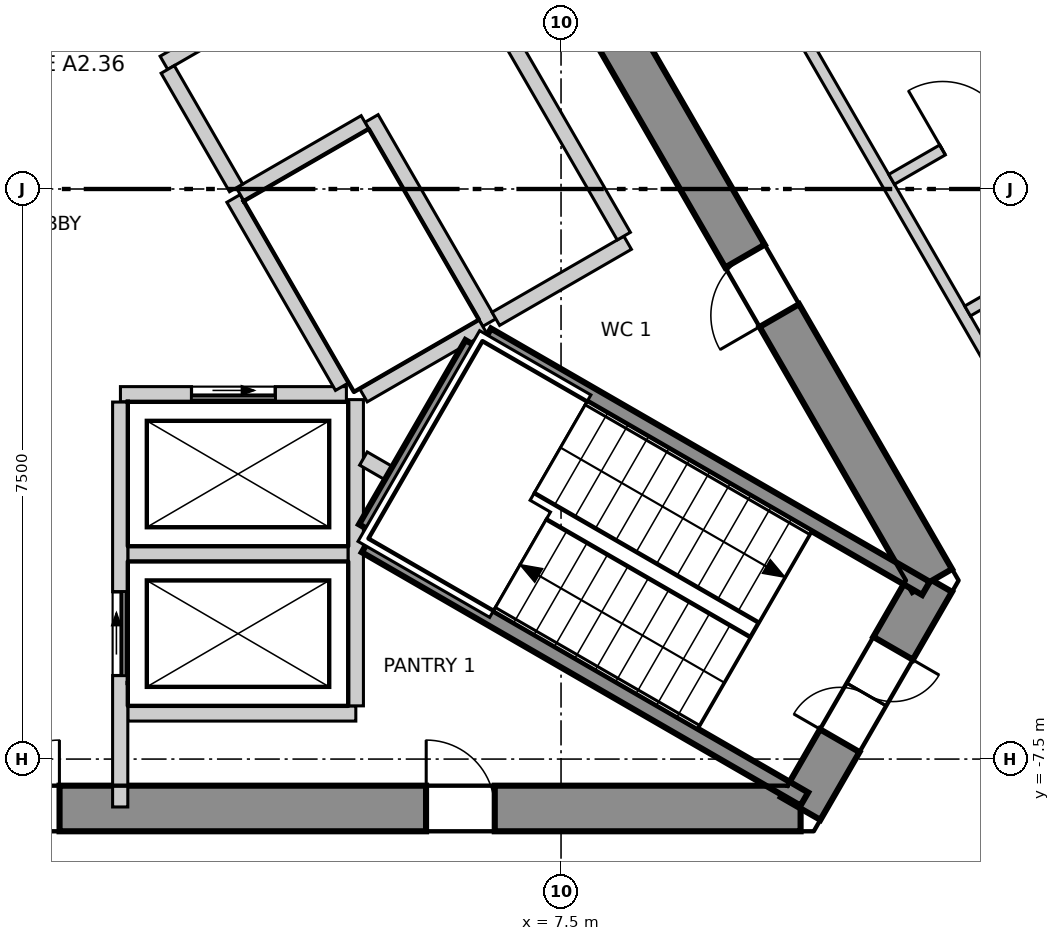
"""IFC4 building model, lengths in metres.
Left out: names, types, materials, properties, quantities, classifications, styles, units other than length and angle.
Written with IfcOpenShell. Run it as: python <this file> out.ifc"""

import sys

from ifc_helpers import new_model, si_unit, direction, frame, frame_2d, origin, place, context, subcontext, project, spatial, polyline, rectangle, outline, extrude, element, fill, save


model = new_model("IFC4")
c1 = context("Model", 3, precision=1e-05, world=origin(), true_north=direction((0.0, 1.0)))
c2 = subcontext(c1, "Body", "Model", "MODEL_VIEW")
j1 = project(units=[si_unit("LENGTHUNIT", "METRE"), si_unit("PLANEANGLEUNIT", "RADIAN")], contexts=[c1])
p1 = place(None, origin())
s1 = spatial("IfcSite", under=j1, at=p1, CompositionType="ELEMENT")
p2 = place(p1, origin())
s2 = spatial("IfcBuilding", under=s1, at=p2, CompositionType="ELEMENT")
p3 = place(p2, frame((0.0, 0.0, 311.5)))
s3 = spatial("IfcBuildingStorey", under=s2, at=p3, CompositionType="ELEMENT", Elevation=311.5)
p4 = place(p3, frame((-10.652, -8.15, -0.3), z_axis=(0.0, 0.0, 1.0), x_axis=(1.0, 0.0, 0.0)))
e1 = element("IfcWall", 1, at=p4, inside=s3, PredefinedType="SHEAR", context=c2, shape_type="SweptSolid", body=[
    extrude(outline(polyline([(-0.173, -0.3), (1.795, -0.3), (3.763, -0.3), (5.731, -0.3), (7.7, -0.3), (9.668, -0.3), (11.636, -0.3), (13.604, -0.3), (15.573, -0.3), (17.541, -0.3), (19.509, -0.3), (21.477, -0.3), (21.131, 0.3), (19.226, 0.3), (17.321, 0.3), (15.415, 0.3), (13.51, 0.3), (11.605, 0.3), (9.699, 0.3), (7.794, 0.3), (5.889, 0.3), (3.984, 0.3), (2.078, 0.3), (0.173, 0.3), (-0.173, -0.3)])), origin(), (0.0, 0.0, 1.0), 3.6),
])
p5 = place(p4, frame((9.752, 0.0, 0.3)))
e2 = element("IfcOpeningElement", 2, at=p5, cuts=e1, PredefinedType="OPENING", context=c2, shape_type="SweptSolid", body=[
    extrude(rectangle(XDim=1.8, YDim=2.1, at=frame_2d((0.9, 1.05))), frame((0.0, 0.31, 0.0), z_axis=(0.0, -1.0, 0.0), x_axis=(1.0, 0.0, 0.0)), (0.0, 0.0, 1.0), 0.62),
])
p6 = place(p4, frame((4.777, 0.0, 0.3)))
e3 = element("IfcOpeningElement", 3, at=p6, cuts=e1, PredefinedType="OPENING", context=c2, shape_type="SweptSolid", body=[
    extrude(rectangle(XDim=0.9, YDim=2.1, at=frame_2d((0.45, 1.05))), frame((0.0, 0.31, 0.0), z_axis=(0.0, -1.0, 0.0), x_axis=(1.0, 0.0, 0.0)), (0.0, 0.0, 1.0), 0.62),
])
p7 = place(p4, frame((16.378, 0.0, 0.3)))
e4 = element("IfcOpeningElement", 4, at=p7, cuts=e1, PredefinedType="OPENING", context=c2, shape_type="SweptSolid", body=[
    extrude(rectangle(XDim=0.9, YDim=2.1, at=frame_2d((0.45, 1.05))), frame((0.0, 0.31, 0.0), z_axis=(0.0, -1.0, 0.0), x_axis=(1.0, 0.0, 0.0)), (0.0, 0.0, 1.0), 0.62),
])
p8 = place(p3, frame((10.652, -8.15, -0.3), z_axis=(0.0, 0.0, 1.0), x_axis=(0.49997462182, 0.866040055388, 0.0)))
e5 = element("IfcWall", 5, at=p8, inside=s3, PredefinedType="SHEAR", context=c2, shape_type="SweptSolid", body=[
    extrude(outline(polyline([(-0.173, -0.3), (1.732, -0.301), (3.638, -0.301), (3.291, 0.3), (1.732, 0.3), (0.173, 0.3), (-0.173, -0.3)])), origin(), (0.0, 0.0, 1.0), 3.6),
])
p9 = place(p8, frame((1.032, 0.0, 0.3)))
e6 = element("IfcOpeningElement", 6, at=p9, cuts=e5, PredefinedType="OPENING", context=c2, shape_type="SweptSolid", body=[
    extrude(rectangle(XDim=1.4, YDim=2.1, at=frame_2d((0.7, 1.05))), frame((0.0, 0.31, 0.0), z_axis=(0.0, -1.0, 0.0), x_axis=(1.0, 0.0, 0.0)), (0.0, 0.0, 1.0), 0.621),
])
p10 = place(p3, frame((12.384, -5.15, -0.3), z_axis=(0.0, 0.0, 1.0), x_axis=(-0.500000539815, 0.866025092122, 0.0)))
e7 = element("IfcWall", 7, at=p10, inside=s3, PredefinedType="SHEAR", context=c2, shape_type="SweptSolid", body=[
    extrude(outline(polyline([(-0.173, -0.301), (1.795, -0.301), (3.763, -0.301), (5.731, -0.301), (7.7, -0.301), (9.668, -0.301), (11.636, -0.301), (13.604, -0.3), (15.573, -0.3), (17.541, -0.3), (19.509, -0.3), (21.477, -0.3), (21.131, 0.3), (19.226, 0.3), (17.321, 0.3), (15.415, 0.3), (13.51, 0.3), (11.605, 0.3), (9.699, 0.3), (7.794, 0.3), (5.889, 0.3), (3.984, 0.3), (2.078, 0.3), (0.173, 0.3), (-0.173, -0.301)])), origin(), (0.0, 0.0, 1.0), 3.6),
])
p11 = place(p10, frame((16.378, 0.0, 0.3)))
e8 = element("IfcOpeningElement", 8, at=p11, cuts=e7, PredefinedType="OPENING", context=c2, shape_type="SweptSolid", body=[
    extrude(rectangle(XDim=0.9, YDim=2.1, at=frame_2d((0.45, 1.05))), frame((0.0, 0.31, 0.0), z_axis=(0.0, -1.0, 0.0), x_axis=(1.0, 0.0, 0.0)), (0.0, 0.0, 1.0), 0.621),
])
p12 = place(p10, frame((4.026, 0.0, 0.3)))
e9 = element("IfcOpeningElement", 9, at=p12, cuts=e7, PredefinedType="OPENING", context=c2, shape_type="SweptSolid", body=[
    extrude(rectangle(XDim=0.9, YDim=2.1, at=frame_2d((0.45, 1.05))), frame((0.0, 0.31, 0.0), z_axis=(0.0, -1.0, 0.0), x_axis=(1.0, 0.0, 0.0)), (0.0, 0.0, 1.0), 0.621),
])
p13 = place(p3, frame((24.544, -11.385, 0.0), z_axis=(0.0, 0.0, 1.0), x_axis=(-0.500002044679, 0.866024223285, 0.0)))
e10 = element("IfcWall", 10, at=p13, inside=s3, PredefinedType="ELEMENTEDWALL", context=c2, shape_type="SweptSolid", body=[
    extrude(rectangle(XDim=44.243, YDim=0.2, at=frame_2d((22.122, 0.0))), origin(), (0.0, 0.0, 1.0), 3.3),
])
p14 = place(p13, frame((2.056, 0.0, 0.9)))
e11 = element("IfcOpeningElement", 11, at=p14, cuts=e10, PredefinedType="OPENING", context=c2, shape_type="SweptSolid", body=[
    extrude(rectangle(XDim=3.7, YDim=2.2, at=frame_2d((1.85, 1.1))), frame((0.0, 0.11, 0.0), z_axis=(0.0, -1.0, 0.0), x_axis=(1.0, 0.0, 0.0)), (0.0, 0.0, 1.0), 0.22),
])
p15 = place(p13, frame((7.264, 0.0, 0.9)))
e12 = element("IfcOpeningElement", 12, at=p15, cuts=e10, PredefinedType="OPENING", context=c2, shape_type="SweptSolid", body=[
    extrude(rectangle(XDim=3.7, YDim=2.2, at=frame_2d((1.85, 1.1))), frame((0.0, 0.11, 0.0), z_axis=(0.0, -1.0, 0.0), x_axis=(1.0, 0.0, 0.0)), (0.0, 0.0, 1.0), 0.22),
])
p16 = place(p13, frame((12.471, 0.0, 0.9)))
e13 = element("IfcOpeningElement", 13, at=p16, cuts=e10, PredefinedType="OPENING", context=c2, shape_type="SweptSolid", body=[
    extrude(rectangle(XDim=3.7, YDim=2.2, at=frame_2d((1.85, 1.1))), frame((0.0, 0.11, 0.0), z_axis=(0.0, -1.0, 0.0), x_axis=(1.0, 0.0, 0.0)), (0.0, 0.0, 1.0), 0.22),
])
p17 = place(p13, frame((17.678, 0.0, 0.9)))
e14 = element("IfcOpeningElement", 14, at=p17, cuts=e10, PredefinedType="OPENING", context=c2, shape_type="SweptSolid", body=[
    extrude(rectangle(XDim=3.7, YDim=2.2, at=frame_2d((1.85, 1.1))), frame((0.0, 0.11, 0.0), z_axis=(0.0, -1.0, 0.0), x_axis=(1.0, 0.0, 0.0)), (0.0, 0.0, 1.0), 0.22),
])
p18 = place(p13, frame((22.885, 0.0, 0.9)))
e15 = element("IfcOpeningElement", 15, at=p18, cuts=e10, PredefinedType="OPENING", context=c2, shape_type="SweptSolid", body=[
    extrude(rectangle(XDim=3.7, YDim=2.2, at=frame_2d((1.85, 1.1))), frame((0.0, 0.11, 0.0), z_axis=(0.0, -1.0, 0.0), x_axis=(1.0, 0.0, 0.0)), (0.0, 0.0, 1.0), 0.22),
])
p19 = place(p13, frame((28.093, 0.0, 0.9)))
e16 = element("IfcOpeningElement", 16, at=p19, cuts=e10, PredefinedType="OPENING", context=c2, shape_type="SweptSolid", body=[
    extrude(rectangle(XDim=3.7, YDim=2.2, at=frame_2d((1.85, 1.1))), frame((0.0, 0.11, 0.0), z_axis=(0.0, -1.0, 0.0), x_axis=(1.0, 0.0, 0.0)), (0.0, 0.0, 1.0), 0.22),
])
p20 = place(p13, frame((33.3, 0.0, 0.9)))
e17 = element("IfcOpeningElement", 17, at=p20, cuts=e10, PredefinedType="OPENING", context=c2, shape_type="SweptSolid", body=[
    extrude(rectangle(XDim=3.7, YDim=2.2, at=frame_2d((1.85, 1.1))), frame((0.0, 0.11, 0.0), z_axis=(0.0, -1.0, 0.0), x_axis=(1.0, 0.0, 0.0)), (0.0, 0.0, 1.0), 0.22),
])
p21 = place(p13, frame((38.507, 0.0, 0.9)))
e18 = element("IfcOpeningElement", 18, at=p21, cuts=e10, PredefinedType="OPENING", context=c2, shape_type="SweptSolid", body=[
    extrude(rectangle(XDim=3.7, YDim=2.2, at=frame_2d((1.85, 1.1))), frame((0.0, 0.11, 0.0), z_axis=(0.0, -1.0, 0.0), x_axis=(1.0, 0.0, 0.0)), (0.0, 0.0, 1.0), 0.22),
])
p22 = place(p3, frame((0.075, 20.37, 0.0), z_axis=(0.0, 0.0, 1.0), x_axis=(0.500006672087, -0.866021551619, 0.0)))
e19 = element("IfcWall", 19, at=p22, inside=s3, PredefinedType="PARTITIONING", context=c2, shape_type="SweptSolid", body=[
    extrude(rectangle(XDim=35.27, YDim=0.15, at=frame_2d((17.635, 0.0))), origin(), (0.0, 0.0, 1.0), 3.3),
])
p23 = place(p22, frame((31.206, 0.0, 0.0)))
e20 = element("IfcOpeningElement", 20, at=p23, cuts=e19, PredefinedType="OPENING", context=c2, shape_type="SweptSolid", body=[
    extrude(rectangle(XDim=1.0, YDim=2.1, at=frame_2d((0.5, 1.05))), frame((0.0, 0.085, 0.0), z_axis=(0.0, -1.0, 0.0), x_axis=(1.0, 0.0, 0.0)), (0.0, 0.0, 1.0), 0.17),
])
p24 = place(p22, frame((19.968, 0.0, 0.0)))
e21 = element("IfcOpeningElement", 21, at=p24, cuts=e19, PredefinedType="OPENING", context=c2, shape_type="SweptSolid", body=[
    extrude(rectangle(XDim=1.0, YDim=2.1, at=frame_2d((0.5, 1.05))), frame((0.0, 0.085, 0.0), z_axis=(0.0, -1.0, 0.0), x_axis=(1.0, 0.0, 0.0)), (0.0, 0.0, 1.0), 0.17),
])
p25 = place(p22, frame((13.353, 0.0, 0.0)))
e22 = element("IfcOpeningElement", 22, at=p25, cuts=e19, PredefinedType="OPENING", context=c2, shape_type="SweptSolid", body=[
    extrude(rectangle(XDim=1.0, YDim=2.1, at=frame_2d((0.5, 1.05))), frame((0.0, 0.085, 0.0), z_axis=(0.0, -1.0, 0.0), x_axis=(1.0, 0.0, 0.0)), (0.0, 0.0, 1.0), 0.17),
])
p26 = place(p22, frame((7.746, 0.0, 0.0)))
e23 = element("IfcOpeningElement", 23, at=p26, cuts=e19, PredefinedType="OPENING", context=c2, shape_type="SweptSolid", body=[
    extrude(rectangle(XDim=1.0, YDim=2.1, at=frame_2d((0.5, 1.05))), frame((0.0, 0.085, 0.0), z_axis=(0.0, -1.0, 0.0), x_axis=(1.0, 0.0, 0.0)), (0.0, 0.0, 1.0), 0.17),
])
p27 = place(p22, frame((3.038, 0.0, 0.0)))
e24 = element("IfcOpeningElement", 24, at=p27, cuts=e19, PredefinedType="OPENING", context=c2, shape_type="SweptSolid", body=[
    extrude(rectangle(XDim=1.0, YDim=2.1, at=frame_2d((0.5, 1.05))), frame((0.0, 0.085, 0.0), z_axis=(0.0, -1.0, 0.0), x_axis=(1.0, 0.0, 0.0)), (0.0, 0.0, 1.0), 0.17),
])
p28 = place(p3, frame((11.849, 0.127, 0.0), z_axis=(0.0, 0.0, 1.0), x_axis=(0.866014668023, 0.500018594424, 0.0)))
e25 = element("IfcWall", 25, at=p28, inside=s3, PredefinedType="PARTITIONING", context=c2, shape_type="SweptSolid", body=[
    extrude(rectangle(XDim=2.45, YDim=0.15, at=frame_2d((1.225, 0.0))), origin(), (0.0, 0.0, 1.0), 3.3),
])
p29 = place(p28, frame((0.775, 0.0, 0.0)))
e26 = element("IfcOpeningElement", 26, at=p29, cuts=e25, PredefinedType="OPENING", context=c2, shape_type="SweptSolid", body=[
    extrude(rectangle(XDim=0.9, YDim=2.1, at=frame_2d((0.45, 1.05))), frame((0.0, 0.085, 0.0), z_axis=(0.0, -1.0, 0.0), x_axis=(1.0, 0.0, 0.0)), (0.0, 0.0, 1.0), 0.17),
])
p30 = place(p3, frame((12.849, -1.605, 0.0), z_axis=(0.0, 0.0, 1.0), x_axis=(0.866101252082, 0.499868603878, 0.0)))
e27 = element("IfcWall", 27, at=p30, inside=s3, PredefinedType="PARTITIONING", context=c2, shape_type="SweptSolid", body=[
    extrude(rectangle(XDim=2.507, YDim=0.15, at=frame_2d((1.253, 0.0))), origin(), (0.0, 0.0, 1.0), 3.3),
])
p31 = place(p3, frame((1.8, -6.9, 0.0), z_axis=(0.0, 0.0, 1.0), x_axis=(1.0, 0.0, 0.0)))
e28 = element("IfcWall", 28, at=p31, inside=s3, PredefinedType="SOLIDWALL", context=c2, shape_type="SweptSolid", body=[
    extrude(rectangle(XDim=3.0, YDim=0.2, at=frame_2d((1.5, 0.0))), origin(), (0.0, 0.0, 1.0), 3.3),
])
p32 = place(p3, frame((1.8, -4.8, 0.0), z_axis=(0.0, 0.0, 1.0), x_axis=(1.0, 0.0, 0.0)))
e29 = element("IfcWall", 29, at=p32, inside=s3, PredefinedType="SOLIDWALL", context=c2, shape_type="SweptSolid", body=[
    extrude(rectangle(XDim=2.9, YDim=0.2, at=frame_2d((1.45, 0.0))), origin(), (0.0, 0.0, 1.0), 3.3),
])
p33 = place(p3, frame((1.703, -2.7, 0.0), z_axis=(0.0, 0.0, 1.0), x_axis=(1.0, 0.0, 0.0)))
e30 = element("IfcWall", 30, at=p33, inside=s3, PredefinedType="SOLIDWALL", context=c2, shape_type="SweptSolid", body=[
    extrude(rectangle(XDim=2.973, YDim=0.2, at=frame_2d((1.487, 0.0))), origin(), (0.0, 0.0, 1.0), 3.3),
])
p34 = place(p33, frame((0.936, 0.0, 0.0)))
e31 = element("IfcOpeningElement", 31, at=p34, cuts=e30, PredefinedType="OPENING", context=c2, shape_type="SweptSolid", body=[
    extrude(rectangle(XDim=1.1, YDim=2.1, at=frame_2d((0.55, 1.05))), frame((0.0, 0.11, 0.0), z_axis=(0.0, -1.0, 0.0), x_axis=(1.0, 0.0, 0.0)), (0.0, 0.0, 1.0), 0.22),
])
p35 = place(p3, frame((3.19, -0.125, 0.0), z_axis=(0.0, 0.0, 1.0), x_axis=(0.499988658015, -0.866031951983, 0.0)))
e32 = element("IfcWall", 32, at=p35, inside=s3, PredefinedType="SOLIDWALL", context=c2, shape_type="SweptSolid", body=[
    extrude(rectangle(XDim=2.858, YDim=0.2, at=frame_2d((1.429, 0.0))), origin(), (0.0, 0.0, 1.0), 3.3),
])
p36 = place(p3, frame((1.7, -8.13, 0.0), z_axis=(0.0, 0.0, 1.0), x_axis=(0.0, 1.0, 0.0)))
e33 = element("IfcWall", 33, at=p36, inside=s3, PredefinedType="SOLIDWALL", context=c2, shape_type="SweptSolid", body=[
    extrude(rectangle(XDim=5.327, YDim=0.2, at=frame_2d((2.664, 0.0))), origin(), (0.0, 0.0, 1.0), 3.3),
])
p37 = place(p36, frame((1.73, 0.0, 0.0)))
e34 = element("IfcOpeningElement", 34, at=p37, cuts=e33, PredefinedType="OPENING", context=c2, shape_type="SweptSolid", body=[
    extrude(rectangle(XDim=1.1, YDim=2.1, at=frame_2d((0.55, 1.05))), frame((0.0, 0.11, 0.0), z_axis=(0.0, -1.0, 0.0), x_axis=(1.0, 0.0, 0.0)), (0.0, 0.0, 1.0), 0.22),
])
p38 = place(p3, frame((4.8, -6.8, 0.0), z_axis=(0.0, 0.0, 1.0), x_axis=(0.0, 1.0, 0.0)))
e35 = element("IfcWall", 35, at=p38, inside=s3, PredefinedType="SOLIDWALL", context=c2, shape_type="SweptSolid", body=[
    extrude(rectangle(XDim=4.029, YDim=0.2, at=frame_2d((2.015, 0.0))), origin(), (0.0, 0.0, 1.0), 3.3),
])
p39 = place(p3, frame((5.007, 0.928, 0.0), z_axis=(0.0, 0.0, 1.0), x_axis=(0.499899694197, -0.866083307622, 0.0)))
e36 = element("IfcWall", 36, at=p39, inside=s3, PredefinedType="SOLIDWALL", context=c2, shape_type="SweptSolid", body=[
    extrude(rectangle(XDim=3.1, YDim=0.2, at=frame_2d((1.55, 0.0))), origin(), (0.0, 0.0, 1.0), 3.3),
])
p40 = place(p3, frame((3.278, -0.071, 0.0), z_axis=(0.0, 0.0, 1.0), x_axis=(0.865784509405, 0.500417009377, 0.0)))
e37 = element("IfcWall", 37, at=p40, inside=s3, PredefinedType="SOLIDWALL", context=c2, shape_type="SweptSolid", body=[
    extrude(rectangle(XDim=1.896, YDim=0.2, at=frame_2d((0.948, 0.0))), origin(), (0.0, 0.0, 1.0), 3.3),
])
p41 = place(p3, frame((2.275, 1.66, 0.0), z_axis=(0.0, 0.0, 1.0), x_axis=(0.866013608182, 0.500020430026, 0.0)))
e38 = element("IfcWall", 38, at=p41, inside=s3, PredefinedType="SOLIDWALL", context=c2, shape_type="SweptSolid", body=[
    extrude(rectangle(XDim=4.35, YDim=0.2, at=frame_2d((2.175, 0.0))), origin(), (0.0, 0.0, 1.0), 3.3),
])
p42 = place(p3, frame((2.325, 1.573, 0.0), z_axis=(0.0, 0.0, 1.0), x_axis=(0.500004188491, -0.866022985545, 0.0)))
e39 = element("IfcWall", 39, at=p42, inside=s3, PredefinedType="SOLIDWALL", context=c2, shape_type="SweptSolid", body=[
    extrude(rectangle(XDim=1.8, YDim=0.2, at=frame_2d((0.9, 0.0))), origin(), (0.0, 0.0, 1.0), 3.3),
])
p43 = place(p3, frame((4.9, -2.714, 0.0), z_axis=(0.0, 0.0, 1.0), x_axis=(0.865846928409, 0.500309001083, 0.0)))
e40 = element("IfcWall", 40, at=p43, inside=s3, PredefinedType="SOLIDWALL", context=c2, shape_type="SweptSolid", body=[
    extrude(rectangle(XDim=1.813, YDim=0.2, at=frame_2d((0.907, 0.0))), origin(), (0.0, 0.0, 1.0), 3.3),
])
p44 = place(p3, frame((4.9, -3.546, 0.0), z_axis=(0.0, 0.0, 1.0), x_axis=(0.865527936036, -0.500860651221, 0.0)))
e41 = element("IfcWall", 41, at=p44, inside=s3, PredefinedType="SOLIDWALL", context=c2, shape_type="SweptSolid", body=[
    extrude(rectangle(XDim=0.384, YDim=0.2, at=frame_2d((0.192, 0.0))), origin(), (0.0, 0.0, 1.0), 3.3),
])
p45 = place(p3, frame((6.642, -1.708, 0.0), z_axis=(0.0, 0.0, 1.0), x_axis=(0.866043441391, 0.499968756647, 0.0)))
e42 = element("IfcWall", 42, at=p45, inside=s3, PredefinedType="SOLIDWALL", context=c2, shape_type="SweptSolid", body=[
    extrude(rectangle(XDim=2.002, YDim=0.2, at=frame_2d((1.001, 0.0))), origin(), (0.0, 0.0, 1.0), 3.3),
])
p46 = place(p3, frame((6.826, 1.978, 0.0), z_axis=(0.0, 0.0, 1.0), x_axis=(0.499990139034, -0.866031096941, 0.0)))
e43 = element("IfcWall", 43, at=p46, inside=s3, PredefinedType="SOLIDWALL", context=c2, shape_type="SweptSolid", body=[
    extrude(rectangle(XDim=3.0, YDim=0.2, at=frame_2d((1.5, 0.0))), origin(), (0.0, 0.0, 1.0), 3.3),
])
p47 = place(p3, frame((4.929, -4.462, 0.0), z_axis=(0.0, 0.0, 1.0), x_axis=(0.500200581029, 0.865909567298, 0.0)))
e44 = element("IfcWall", 44, at=p47, inside=s3, PredefinedType="SOLIDWALL", context=c2, shape_type="SweptSolid", body=[
    extrude(rectangle(XDim=2.799, YDim=0.2, at=frame_2d((1.399, 0.0))), origin(), (0.0, 0.0, 1.0), 3.3),
])
p48 = place(p3, frame((6.529, -1.922, 0.0), z_axis=(0.0, 0.0, 1.0), x_axis=(0.866068467981, -0.499925403204, 0.0)))
e45 = element("IfcWall", 45, at=p48, inside=s3, PredefinedType="SOLIDWALL", context=c2, shape_type="SweptSolid", body=[
    extrude(rectangle(XDim=6.665, YDim=0.2, at=frame_2d((3.332, 0.0))), origin(), (0.0, 0.0, 1.0), 3.3),
])
p49 = place(p3, frame((4.929, -4.693, 0.0), z_axis=(0.0, 0.0, 1.0), x_axis=(0.866005022404, -0.500035299925, 0.0)))
e46 = element("IfcWall", 46, at=p49, inside=s3, PredefinedType="SOLIDWALL", context=c2, shape_type="SweptSolid", body=[
    extrude(rectangle(XDim=6.665, YDim=0.2, at=frame_2d((3.333, 0.0))), origin(), (0.0, 0.0, 1.0), 3.3),
])
p50 = place(p34, origin())
e47 = element("IfcDoor", 47, at=p50, inside=s3, OperationType="SLIDING_TO_LEFT", PredefinedType="DOOR", context=c2, shape_type="SweptSolid", body=[
    extrude(rectangle(XDim=1.1, YDim=2.1, at=frame_2d((0.55, 1.05))), frame((0.0, 0.025, 0.0), z_axis=(0.0, -1.0, 0.0), x_axis=(1.0, 0.0, 0.0)), (0.0, 0.0, 1.0), 0.05),
])
fill(e31, e47)
p51 = place(p37, origin())
e48 = element("IfcDoor", 48, at=p51, inside=s3, OperationType="SLIDING_TO_LEFT", PredefinedType="DOOR", context=c2, shape_type="SweptSolid", body=[
    extrude(rectangle(XDim=1.1, YDim=2.1, at=frame_2d((0.55, 1.05))), frame((0.0, 0.025, 0.0), z_axis=(0.0, -1.0, 0.0), x_axis=(1.0, 0.0, 0.0)), (0.0, 0.0, 1.0), 0.05),
])
fill(e34, e48)
p52 = place(p29, origin())
e49 = element("IfcDoor", 49, at=p52, inside=s3, OperationType="SINGLE_SWING_RIGHT", PredefinedType="DOOR", context=c2, shape_type="SweptSolid", body=[
    extrude(rectangle(XDim=0.9, YDim=2.1, at=frame_2d((0.45, 1.05))), frame((0.0, 0.025, 0.0), z_axis=(0.0, -1.0, 0.0), x_axis=(1.0, 0.0, 0.0)), (0.0, 0.0, 1.0), 0.05),
])
fill(e26, e49)
p53 = place(p5, origin())
e50 = element("IfcDoor", 50, at=p53, inside=s3, OperationType="DOUBLE_DOOR_SINGLE_SWING", PredefinedType="DOOR", context=c2, shape_type="SweptSolid", body=[
    extrude(rectangle(XDim=1.8, YDim=2.1, at=frame_2d((0.9, 1.05))), frame((0.0, 0.025, 0.0), z_axis=(0.0, -1.0, 0.0), x_axis=(1.0, 0.0, 0.0)), (0.0, 0.0, 1.0), 0.05),
])
fill(e2, e50)
p54 = place(p9, origin())
e51 = element("IfcDoor", 51, at=p54, inside=s3, OperationType="DOUBLE_DOOR_SINGLE_SWING", PredefinedType="DOOR", context=c2, shape_type="SweptSolid", body=[
    extrude(rectangle(XDim=1.4, YDim=2.1, at=frame_2d((0.7, 1.05))), frame((0.0, 0.025, 0.0), z_axis=(0.0, -1.0, 0.0), x_axis=(1.0, 0.0, 0.0)), (0.0, 0.0, 1.0), 0.05),
])
fill(e6, e51)
p55 = place(p7, origin())
e52 = element("IfcDoor", 52, at=p55, inside=s3, OperationType="SINGLE_SWING_RIGHT", PredefinedType="DOOR", context=c2, shape_type="SweptSolid", body=[
    extrude(rectangle(XDim=0.9, YDim=2.1, at=frame_2d((0.45, 1.05))), frame((0.0, 0.025, 0.0), z_axis=(0.0, -1.0, 0.0), x_axis=(1.0, 0.0, 0.0)), (0.0, 0.0, 1.0), 0.05),
])
fill(e4, e52)
p56 = place(p12, origin())
e53 = element("IfcDoor", 53, at=p56, inside=s3, OperationType="SINGLE_SWING_RIGHT", PredefinedType="DOOR", context=c2, shape_type="SweptSolid", body=[
    extrude(rectangle(XDim=0.9, YDim=2.1, at=frame_2d((0.45, 1.05))), frame((0.0, 0.025, 0.0), z_axis=(0.0, -1.0, 0.0), x_axis=(1.0, 0.0, 0.0)), (0.0, 0.0, 1.0), 0.05),
])
fill(e9, e53)
save(model, sys.argv[1])
